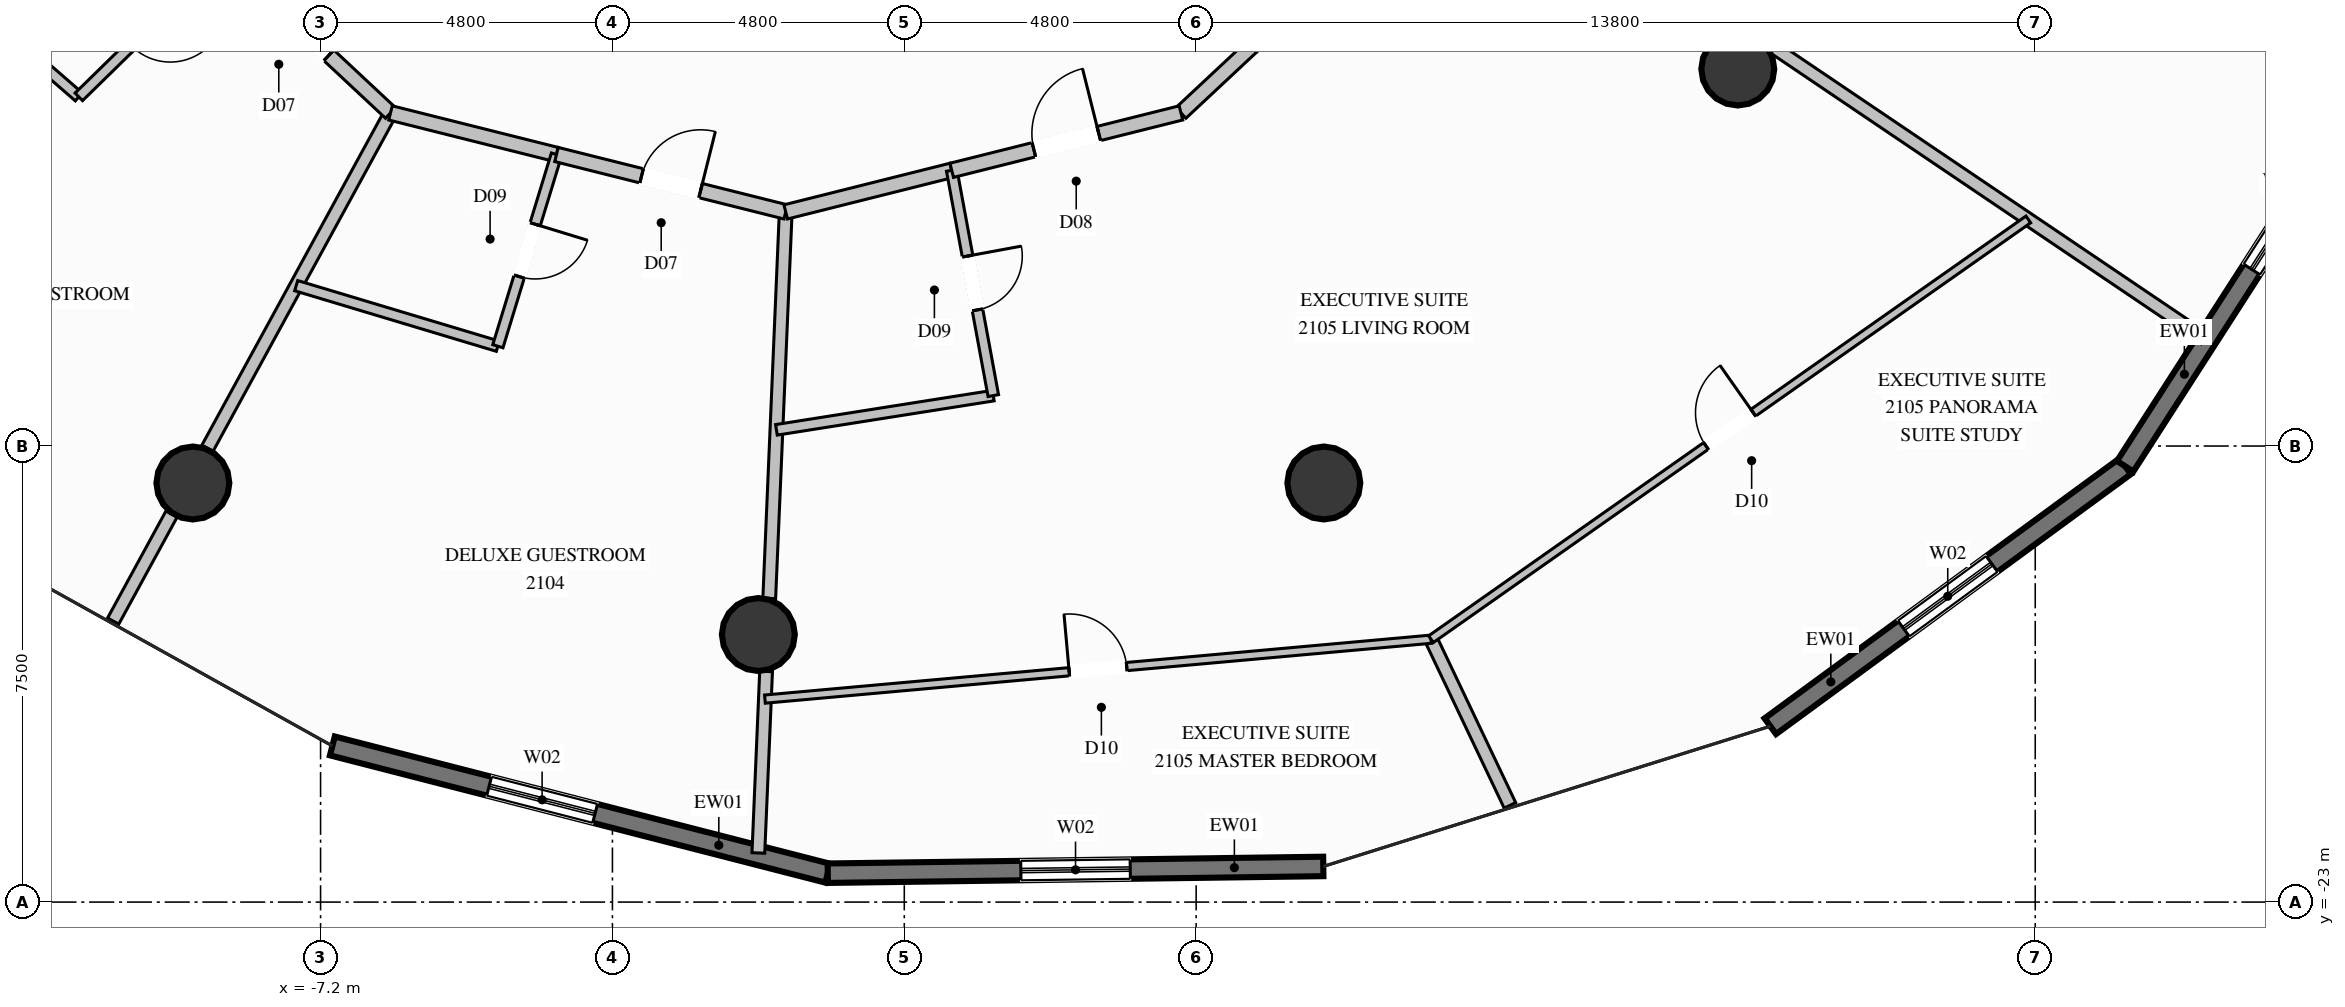
"""IFC4 building model, lengths in metres.
Left out: names, types, materials, properties, quantities, classifications, styles, units other than length and angle.
Written with IfcOpenShell. Run it as: python <this file> out.ifc"""

import sys

from ifc_helpers import new_model, si_unit, direction, frame, frame_2d, origin, origin_2d, place, context, subcontext, project, spatial, rectangle, circle, extrude, element, fill, save


model = new_model("IFC4")
c1 = context("Model", 3, precision=1e-05, world=origin(), true_north=direction((0.0, 1.0)))
c2 = subcontext(c1, "Body", "Model", "MODEL_VIEW")
j1 = project(units=[si_unit("LENGTHUNIT", "METRE"), si_unit("PLANEANGLEUNIT", "RADIAN")], contexts=[c1])
p1 = place(None, origin())
s1 = spatial("IfcSite", under=j1, at=p1, CompositionType="ELEMENT")
p2 = place(p1, origin())
s2 = spatial("IfcBuilding", under=s1, at=p2, CompositionType="ELEMENT")
p3 = place(p2, frame((0.0, 0.0, 78.8)))
s3 = spatial("IfcBuildingStorey", under=s2, at=p3, CompositionType="ELEMENT", Elevation=78.8)
for number, where, z_axis, x_axis in (
    (1, (-9.3, -16.108, 0.0), (0.0, 0.0, 1.0), (1.0, 0.0, 0.0)),
    (2, (0.0, -18.6, 0.0), (0.0, 0.0, 1.0), (1.0, 0.0, 0.0)),
    (3, (9.3, -16.108, 0.0), (0.0, 0.0, 1.0), (1.0, 0.0, 0.0)),
    (4, (16.108, -9.3, 0.0), (0.0, 0.0, 1.0), (1.0, 0.0, 0.0)),
):
    element("IfcColumn", number, at=place(p3, frame(where, z_axis=z_axis, x_axis=x_axis)), inside=s3, PredefinedType="COLUMN", context=c2, shape_type="SweptSolid", body=[
        extrude(circle(Radius=0.6, at=origin_2d()), origin(), (0.0, 0.0, 1.0), 3.6),
    ])
p4 = place(p3, frame((1.142, -22.525, 0.0), z_axis=(0.0, 0.0, 1.0), x_axis=(-0.968556896671, 0.248792158057, 0.0)))
e5 = element("IfcWall", 5, at=p4, inside=s3, PredefinedType="SOLIDWALL", context=c2, shape_type="SweptSolid", body=[
    extrude(rectangle(XDim=8.413, YDim=0.32, at=frame_2d((4.206, 0.0))), origin(), (0.0, 0.0, 1.0), 3.34),
])
p5 = place(p4, frame((3.951, 0.0, 0.35)))
e6 = element("IfcOpeningElement", 6, at=p5, cuts=e5, PredefinedType="OPENING", context=c2, shape_type="SweptSolid", body=[
    extrude(rectangle(XDim=1.8, YDim=2.6, at=frame_2d((0.9, 1.3))), frame((0.0, 0.17, 0.0), z_axis=(0.0, -1.0, 0.0), x_axis=(1.0, 0.0, 0.0)), (0.0, 0.0, 1.0), 0.34),
])
p6 = place(p3, frame((9.291, -22.414, 0.0), z_axis=(0.0, 0.0, 1.0), x_axis=(-0.999907508711, -0.013600515578, 0.0)))
e7 = element("IfcWall", 7, at=p6, inside=s3, PredefinedType="SOLIDWALL", context=c2, shape_type="SweptSolid", body=[
    extrude(rectangle(XDim=8.15, YDim=0.32, at=frame_2d((4.075, 0.0))), origin(), (0.0, 0.0, 1.0), 3.34),
])
p7 = place(p6, frame((3.175, 0.0, 0.35)))
e8 = element("IfcOpeningElement", 8, at=p7, cuts=e7, PredefinedType="OPENING", context=c2, shape_type="SweptSolid", body=[
    extrude(rectangle(XDim=1.8, YDim=2.6, at=frame_2d((0.9, 1.3))), frame((0.0, 0.17, 0.0), z_axis=(0.0, -1.0, 0.0), x_axis=(1.0, 0.0, 0.0)), (0.0, 0.0, 1.0), 0.34),
])
p8 = place(p3, frame((22.479, -15.833, 0.0), z_axis=(0.0, 0.0, 1.0), x_axis=(-0.806720320821, -0.59093343447, 0.0)))
e9 = element("IfcWall", 9, at=p8, inside=s3, PredefinedType="SOLIDWALL", context=c2, shape_type="SweptSolid", body=[
    extrude(rectangle(XDim=7.234, YDim=0.32, at=frame_2d((3.617, 0.0))), origin(), (0.0, 0.0, 1.0), 3.34),
])
p9 = place(p8, frame((2.717, 0.0, 0.35)))
e10 = element("IfcOpeningElement", 10, at=p9, cuts=e9, PredefinedType="OPENING", context=c2, shape_type="SweptSolid", body=[
    extrude(rectangle(XDim=1.8, YDim=2.6, at=frame_2d((0.9, 1.3))), frame((0.0, 0.17, 0.0), z_axis=(0.0, -1.0, 0.0), x_axis=(1.0, 0.0, 0.0)), (0.0, 0.0, 1.0), 0.34),
])
p10 = place(p3, frame((26.226, -10.009, 0.0), z_axis=(0.0, 0.0, 1.0), x_axis=(-0.541072927061, -0.840975675987, 0.0)))
e11 = element("IfcWall", 11, at=p10, inside=s3, PredefinedType="SOLIDWALL", context=c2, shape_type="SweptSolid", body=[
    extrude(rectangle(XDim=6.925, YDim=0.32, at=frame_2d((3.463, 0.0))), origin(), (0.0, 0.0, 1.0), 3.34),
])
p11 = place(p10, frame((1.276, 0.0, 0.35)))
e12 = element("IfcOpeningElement", 12, at=p11, cuts=e11, PredefinedType="OPENING", context=c2, shape_type="SweptSolid", body=[
    extrude(rectangle(XDim=1.8, YDim=2.6, at=frame_2d((0.9, 1.3))), frame((0.0, 0.17, 0.0), z_axis=(0.0, -1.0, 0.0), x_axis=(1.0, 0.0, 0.0)), (0.0, 0.0, 1.0), 0.34),
])
p12 = place(p3, frame((-6.05, -10.022, 0.0), z_axis=(0.0, 0.0, 1.0), x_axis=(-0.479148902138, -0.877733632476, 0.0)))
e13 = element("IfcWall", 13, at=p12, inside=s3, PredefinedType="PARTITIONING", context=c2, shape_type="SweptSolid", body=[
    extrude(rectangle(XDim=6.282, YDim=0.21, at=frame_2d((3.141, 0.0))), origin(), (0.0, 0.0, 1.0), 2.708),
])
p13 = place(p3, frame((-9.651, -16.619, 0.0), z_axis=(0.0, 0.0, 1.0), x_axis=(-0.478928914957, -0.877853686225, 0.0)))
e14 = element("IfcWall", 14, at=p13, inside=s3, PredefinedType="PARTITIONING", context=c2, shape_type="SweptSolid", body=[
    extrude(rectangle(XDim=2.005, YDim=0.21, at=frame_2d((1.002, 0.0))), origin(), (0.0, 0.0, 1.0), 3.34),
])
p14 = place(p3, frame((0.45, -11.65, 0.0), z_axis=(0.0, 0.0, 1.0), x_axis=(-0.042596217777, -0.999092369219, 0.0)))
e15 = element("IfcWall", 15, at=p14, inside=s3, PredefinedType="PARTITIONING", context=c2, shape_type="SweptSolid", body=[
    extrude(rectangle(XDim=6.362, YDim=0.21, at=frame_2d((3.181, 0.0))), origin(), (0.0, 0.0, 1.0), 3.34),
])
p15 = place(p3, frame((0.127, -19.207, 0.0), z_axis=(0.0, 0.0, 1.0), x_axis=(-0.042493889898, -0.999096726709, 0.0)))
e16 = element("IfcWall", 16, at=p15, inside=s3, PredefinedType="PARTITIONING", context=c2, shape_type="SweptSolid", body=[
    extrude(rectangle(XDim=2.988, YDim=0.21, at=frame_2d((1.494, 0.0))), origin(), (0.0, 0.0, 1.0), 3.34),
])
p16 = place(p3, frame((16.623, -8.895, 0.0), z_axis=(0.0, 0.0, 1.0), x_axis=(0.828723201791, -0.559658694933, 0.0)))
e17 = element("IfcWall", 17, at=p16, inside=s3, PredefinedType="PARTITIONING", context=c2, shape_type="SweptSolid", body=[
    extrude(rectangle(XDim=8.641, YDim=0.21, at=frame_2d((4.32, 0.0))), origin(), (0.0, 0.0, 1.0), 3.34),
])
p17 = place(p3, frame((-13.765, -7.508, 0.0), z_axis=(0.0, 0.0, 1.0), x_axis=(0.754777121654, -0.655981323384, 0.0)))
e18 = element("IfcWall", 18, at=p17, inside=s3, PredefinedType="PLUMBINGWALL", context=c2, shape_type="SweptSolid", body=[
    extrude(rectangle(XDim=3.43, YDim=0.175, at=frame_2d((1.715, 0.0))), origin(), (0.0, 0.0, 1.0), 3.34),
])
p18 = place(p3, frame((-8.81, -7.443, 0.0), z_axis=(0.0, 0.0, 1.0), x_axis=(-0.714772306892, -0.699357240114, 0.0)))
e19 = element("IfcWall", 19, at=p18, inside=s3, PredefinedType="PLUMBINGWALL", context=c2, shape_type="SweptSolid", body=[
    extrude(rectangle(XDim=3.31, YDim=0.175, at=frame_2d((1.655, 0.0))), origin(), (0.0, 0.0, 1.0), 2.708),
])
p19 = place(p18, frame((1.205, 0.0, 0.0)))
e20 = element("IfcOpeningElement", 20, at=p19, cuts=e19, PredefinedType="OPENING", context=c2, shape_type="SweptSolid", body=[
    extrude(rectangle(XDim=0.9, YDim=2.1, at=frame_2d((0.45, 1.05))), frame((0.0, 0.098, 0.0), z_axis=(0.0, -1.0, 0.0), x_axis=(1.0, 0.0, 0.0)), (0.0, 0.0, 1.0), 0.195),
])
p20 = place(p3, frame((-8.81, -7.443, 0.0), z_axis=(0.0, 0.0, 1.0), x_axis=(0.730679025356, -0.682721145054, 0.0)))
e21 = element("IfcWall", 21, at=p20, inside=s3, PredefinedType="PARTITIONING", context=c2, shape_type="SweptSolid", body=[
    extrude(rectangle(XDim=3.777, YDim=0.24, at=frame_2d((1.889, 0.0))), origin(), (0.0, 0.0, 1.0), 3.34),
])
p21 = place(p20, frame((1.389, 0.0, 0.0)))
e22 = element("IfcOpeningElement", 22, at=p21, cuts=e21, PredefinedType="OPENING", context=c2, shape_type="SweptSolid", body=[
    extrude(rectangle(XDim=1.0, YDim=2.2, at=frame_2d((0.5, 1.1))), frame((0.0, 0.13, 0.0), z_axis=(0.0, -1.0, 0.0), x_axis=(1.0, 0.0, 0.0)), (0.0, 0.0, 1.0), 0.26),
])
p22 = place(p3, frame((-6.05, -10.022, 0.0), z_axis=(0.0, 0.0, 1.0), x_axis=(0.970009682466, -0.243066278865, 0.0)))
e23 = element("IfcWall", 23, at=p22, inside=s3, PredefinedType="PARTITIONING", context=c2, shape_type="SweptSolid", body=[
    extrude(rectangle(XDim=2.814, YDim=0.24, at=frame_2d((1.407, 0.0))), origin(), (0.0, 0.0, 1.0), 3.34),
])
p23 = place(p3, frame((-7.601, -12.863, 0.0), z_axis=(0.0, 0.0, 1.0), x_axis=(0.957770002885, -0.287535426641, 0.0)))
e24 = element("IfcWall", 24, at=p23, inside=s3, PredefinedType="PLUMBINGWALL", context=c2, shape_type="SweptSolid", body=[
    extrude(rectangle(XDim=3.463, YDim=0.175, at=frame_2d((1.732, 0.0))), origin(), (0.0, 0.0, 1.0), 3.34),
])
p24 = place(p3, frame((-3.32, -10.706, 0.0), z_axis=(0.0, 0.0, 1.0), x_axis=(-0.292357752571, -0.956309021453, 0.0)))
e25 = element("IfcWall", 25, at=p24, inside=s3, PredefinedType="PLUMBINGWALL", context=c2, shape_type="SweptSolid", body=[
    extrude(rectangle(XDim=3.297, YDim=0.175, at=frame_2d((1.648, 0.0))), origin(), (0.0, 0.0, 1.0), 3.34),
])
p25 = place(p24, frame((1.199, 0.0, 0.0)))
e26 = element("IfcOpeningElement", 26, at=p25, cuts=e25, PredefinedType="OPENING", context=c2, shape_type="SweptSolid", body=[
    extrude(rectangle(XDim=0.9, YDim=2.1, at=frame_2d((0.45, 1.05))), frame((0.0, 0.098, 0.0), z_axis=(0.0, -1.0, 0.0), x_axis=(1.0, 0.0, 0.0)), (0.0, 0.0, 1.0), 0.195),
])
p26 = place(p3, frame((-3.32, -10.706, 0.0), z_axis=(0.0, 0.0, 1.0), x_axis=(0.970061149619, -0.24286079552, 0.0)))
e27 = element("IfcWall", 27, at=p26, inside=s3, PredefinedType="PARTITIONING", context=c2, shape_type="SweptSolid", body=[
    extrude(rectangle(XDim=3.886, YDim=0.24, at=frame_2d((1.943, 0.0))), origin(), (0.0, 0.0, 1.0), 2.918),
])
p27 = place(p26, frame((1.443, 0.0, 0.0)))
e28 = element("IfcOpeningElement", 28, at=p27, cuts=e27, PredefinedType="OPENING", context=c2, shape_type="SweptSolid", body=[
    extrude(rectangle(XDim=1.0, YDim=2.2, at=frame_2d((0.5, 1.1))), frame((0.0, 0.13, 0.0), z_axis=(0.0, -1.0, 0.0), x_axis=(1.0, 0.0, 0.0)), (0.0, 0.0, 1.0), 0.26),
])
p28 = place(p3, frame((0.45, -11.65, 0.0), z_axis=(0.0, 0.0, 1.0), x_axis=(0.97003013248, 0.242984654004, 0.0)))
e29 = element("IfcWall", 29, at=p28, inside=s3, PredefinedType="PARTITIONING", context=c2, shape_type="SweptSolid", body=[
    extrude(rectangle(XDim=2.814, YDim=0.24, at=frame_2d((1.407, 0.0))), origin(), (0.0, 0.0, 1.0), 2.918),
])
p29 = place(p3, frame((0.297, -15.234, 0.0), z_axis=(0.0, 0.0, 1.0), x_axis=(0.987771734702, 0.155907023971, 0.0)))
e30 = element("IfcWall", 30, at=p29, inside=s3, PredefinedType="PLUMBINGWALL", context=c2, shape_type="SweptSolid", body=[
    extrude(rectangle(XDim=3.611, YDim=0.175, at=frame_2d((1.806, 0.0))), origin(), (0.0, 0.0, 1.0), 3.34),
])
p30 = place(p3, frame((3.18, -10.966, 0.0), z_axis=(0.0, 0.0, 1.0), x_axis=(0.181576402411, -0.983376840325, 0.0)))
e31 = element("IfcWall", 31, at=p30, inside=s3, PredefinedType="PLUMBINGWALL", context=c2, shape_type="SweptSolid", body=[
    extrude(rectangle(XDim=3.768, YDim=0.175, at=frame_2d((1.884, 0.0))), origin(), (0.0, 0.0, 1.0), 3.34),
])
p31 = place(p30, frame((1.434, 0.0, 0.0)))
e32 = element("IfcOpeningElement", 32, at=p31, cuts=e31, PredefinedType="OPENING", context=c2, shape_type="SweptSolid", body=[
    extrude(rectangle(XDim=0.9, YDim=2.1, at=frame_2d((0.45, 1.05))), frame((0.0, 0.098, 0.0), z_axis=(0.0, -1.0, 0.0), x_axis=(1.0, 0.0, 0.0)), (0.0, 0.0, 1.0), 0.195),
])
p32 = place(p3, frame((11.062, -18.677, 0.0), z_axis=(0.0, 0.0, 1.0), x_axis=(0.429310241151, -0.90315708315, 0.0)))
e33 = element("IfcWall", 33, at=p32, inside=s3, PredefinedType="PARTITIONING", context=c2, shape_type="SweptSolid", body=[
    extrude(rectangle(XDim=3.026, YDim=0.21, at=frame_2d((1.513, 0.0))), origin(), (0.0, 0.0, 1.0), 3.34),
])
p33 = place(p3, frame((6.95, -10.022, 0.0), z_axis=(0.0, 0.0, 1.0), x_axis=(0.730582633102, 0.682824293804, 0.0)))
e34 = element("IfcWall", 34, at=p33, inside=s3, PredefinedType="PARTITIONING", context=c2, shape_type="SweptSolid", body=[
    extrude(rectangle(XDim=6.513, YDim=0.24, at=frame_2d((3.256, 0.0))), origin(), (0.0, 0.0, 1.0), 3.34),
])
p34 = place(p3, frame((3.18, -10.966, 0.0), z_axis=(0.0, 0.0, 1.0), x_axis=(0.970046348371, 0.242919908636, 0.0)))
e35 = element("IfcWall", 35, at=p34, inside=s3, PredefinedType="PARTITIONING", context=c2, shape_type="SweptSolid", body=[
    extrude(rectangle(XDim=3.886, YDim=0.24, at=frame_2d((1.943, 0.0))), origin(), (0.0, 0.0, 1.0), 3.34),
])
p35 = place(p34, frame((1.393, 0.0, 0.0)))
e36 = element("IfcOpeningElement", 36, at=p35, cuts=e35, PredefinedType="OPENING", context=c2, shape_type="SweptSolid", body=[
    extrude(rectangle(XDim=1.1, YDim=2.3, at=frame_2d((0.55, 1.15))), frame((0.0, 0.13, 0.0), z_axis=(0.0, -1.0, 0.0), x_axis=(1.0, 0.0, 0.0)), (0.0, 0.0, 1.0), 0.26),
])
p36 = place(p3, frame((0.108, -19.662, 0.0), z_axis=(0.0, 0.0, 1.0), x_axis=(0.995980619594, 0.089568997951, 0.0)))
e37 = element("IfcWall", 37, at=p36, inside=s3, PredefinedType="PARTITIONING", context=c2, shape_type="SweptSolid", body=[
    extrude(rectangle(XDim=10.998, YDim=0.135, at=frame_2d((5.499, 0.0))), origin(), (0.0, 0.0, 1.0), 3.34),
])
p37 = place(p36, frame((5.024, 0.0, 0.0)))
e38 = element("IfcOpeningElement", 38, at=p37, cuts=e37, PredefinedType="OPENING", context=c2, shape_type="SweptSolid", body=[
    extrude(rectangle(XDim=0.95, YDim=2.1, at=frame_2d((0.475, 1.05))), frame((0.0, 0.078, 0.0), z_axis=(0.0, -1.0, 0.0), x_axis=(1.0, 0.0, 0.0)), (0.0, 0.0, 1.0), 0.155),
])
p38 = place(p3, frame((11.062, -18.677, 0.0), z_axis=(0.0, 0.0, 1.0), x_axis=(0.818201778995, 0.574931168793, 0.0)))
e39 = element("IfcWall", 39, at=p38, inside=s3, PredefinedType="PARTITIONING", context=c2, shape_type="SweptSolid", body=[
    extrude(rectangle(XDim=12.007, YDim=0.135, at=frame_2d((6.003, 0.0))), origin(), (0.0, 0.0, 1.0), 3.34),
])
p39 = place(p38, frame((5.528, 0.0, 0.0)))
e40 = element("IfcOpeningElement", 40, at=p39, cuts=e39, PredefinedType="OPENING", context=c2, shape_type="SweptSolid", body=[
    extrude(rectangle(XDim=0.95, YDim=2.1, at=frame_2d((0.475, 1.05))), frame((0.0, 0.078, 0.0), z_axis=(0.0, -1.0, 0.0), x_axis=(1.0, 0.0, 0.0)), (0.0, 0.0, 1.0), 0.155),
])
p40 = place(p5, origin())
e41 = element("IfcWindow", 41, at=p40, inside=s3, PartitioningType="SINGLE_PANEL", PredefinedType="WINDOW", context=c2, shape_type="SweptSolid", body=[
    extrude(rectangle(XDim=1.8, YDim=2.6, at=frame_2d((0.9, 1.3))), frame((0.0, 0.03, 0.0), z_axis=(0.0, -1.0, 0.0), x_axis=(1.0, 0.0, 0.0)), (0.0, 0.0, 1.0), 0.06),
])
fill(e6, e41)
p41 = place(p7, origin())
e42 = element("IfcWindow", 42, at=p41, inside=s3, PartitioningType="SINGLE_PANEL", PredefinedType="WINDOW", context=c2, shape_type="SweptSolid", body=[
    extrude(rectangle(XDim=1.8, YDim=2.6, at=frame_2d((0.9, 1.3))), frame((0.0, 0.03, 0.0), z_axis=(0.0, -1.0, 0.0), x_axis=(1.0, 0.0, 0.0)), (0.0, 0.0, 1.0), 0.06),
])
fill(e8, e42)
p42 = place(p9, origin())
e43 = element("IfcWindow", 43, at=p42, inside=s3, PartitioningType="SINGLE_PANEL", PredefinedType="WINDOW", context=c2, shape_type="SweptSolid", body=[
    extrude(rectangle(XDim=1.8, YDim=2.6, at=frame_2d((0.9, 1.3))), frame((0.0, 0.03, 0.0), z_axis=(0.0, -1.0, 0.0), x_axis=(1.0, 0.0, 0.0)), (0.0, 0.0, 1.0), 0.06),
])
fill(e10, e43)
p43 = place(p11, origin())
e44 = element("IfcWindow", 44, at=p43, inside=s3, PartitioningType="SINGLE_PANEL", PredefinedType="WINDOW", context=c2, shape_type="SweptSolid", body=[
    extrude(rectangle(XDim=1.8, YDim=2.6, at=frame_2d((0.9, 1.3))), frame((0.0, 0.03, 0.0), z_axis=(0.0, -1.0, 0.0), x_axis=(1.0, 0.0, 0.0)), (0.0, 0.0, 1.0), 0.06),
])
fill(e12, e44)
p44 = place(p21, origin())
e45 = element("IfcDoor", 45, at=p44, inside=s3, OperationType="SINGLE_SWING_RIGHT", PredefinedType="DOOR", context=c2, shape_type="SweptSolid", body=[
    extrude(rectangle(XDim=1.0, YDim=2.2, at=frame_2d((0.5, 1.1))), frame((0.0, 0.025, 0.0), z_axis=(0.0, -1.0, 0.0), x_axis=(1.0, 0.0, 0.0)), (0.0, 0.0, 1.0), 0.05),
])
fill(e22, e45)
p45 = place(p25, origin())
e46 = element("IfcDoor", 46, at=p45, inside=s3, OperationType="SINGLE_SWING_LEFT", PredefinedType="DOOR", context=c2, shape_type="SweptSolid", body=[
    extrude(rectangle(XDim=0.9, YDim=2.1, at=frame_2d((0.45, 1.05))), frame((0.0, 0.025, 0.0), z_axis=(0.0, -1.0, 0.0), x_axis=(1.0, 0.0, 0.0)), (0.0, 0.0, 1.0), 0.05),
])
fill(e26, e46)
p46 = place(p27, origin())
e47 = element("IfcDoor", 47, at=p46, inside=s3, OperationType="SINGLE_SWING_RIGHT", PredefinedType="DOOR", context=c2, shape_type="SweptSolid", body=[
    extrude(rectangle(XDim=1.0, YDim=2.2, at=frame_2d((0.5, 1.1))), frame((0.0, 0.025, 0.0), z_axis=(0.0, -1.0, 0.0), x_axis=(1.0, 0.0, 0.0)), (0.0, 0.0, 1.0), 0.05),
])
fill(e28, e47)
p47 = place(p31, origin())
e48 = element("IfcDoor", 48, at=p47, inside=s3, OperationType="SINGLE_SWING_LEFT", PredefinedType="DOOR", context=c2, shape_type="SweptSolid", body=[
    extrude(rectangle(XDim=0.9, YDim=2.1, at=frame_2d((0.45, 1.05))), frame((0.0, 0.025, 0.0), z_axis=(0.0, -1.0, 0.0), x_axis=(1.0, 0.0, 0.0)), (0.0, 0.0, 1.0), 0.05),
])
fill(e32, e48)
p48 = place(p35, origin())
e49 = element("IfcDoor", 49, at=p48, inside=s3, OperationType="SINGLE_SWING_RIGHT", PredefinedType="DOOR", context=c2, shape_type="SweptSolid", body=[
    extrude(rectangle(XDim=1.1, YDim=2.3, at=frame_2d((0.55, 1.15))), frame((0.0, 0.025, 0.0), z_axis=(0.0, -1.0, 0.0), x_axis=(1.0, 0.0, 0.0)), (0.0, 0.0, 1.0), 0.05),
])
fill(e36, e49)
p49 = place(p37, origin())
e50 = element("IfcDoor", 50, at=p49, inside=s3, OperationType="SINGLE_SWING_LEFT", PredefinedType="DOOR", context=c2, shape_type="SweptSolid", body=[
    extrude(rectangle(XDim=0.95, YDim=2.1, at=frame_2d((0.475, 1.05))), frame((0.0, 0.025, 0.0), z_axis=(0.0, -1.0, 0.0), x_axis=(1.0, 0.0, 0.0)), (0.0, 0.0, 1.0), 0.05),
])
fill(e38, e50)
p50 = place(p39, origin())
e51 = element("IfcDoor", 51, at=p50, inside=s3, OperationType="SINGLE_SWING_RIGHT", PredefinedType="DOOR", context=c2, shape_type="SweptSolid", body=[
    extrude(rectangle(XDim=0.95, YDim=2.1, at=frame_2d((0.475, 1.05))), frame((0.0, 0.025, 0.0), z_axis=(0.0, -1.0, 0.0), x_axis=(1.0, 0.0, 0.0)), (0.0, 0.0, 1.0), 0.05),
])
fill(e40, e51)
save(model, sys.argv[1])
